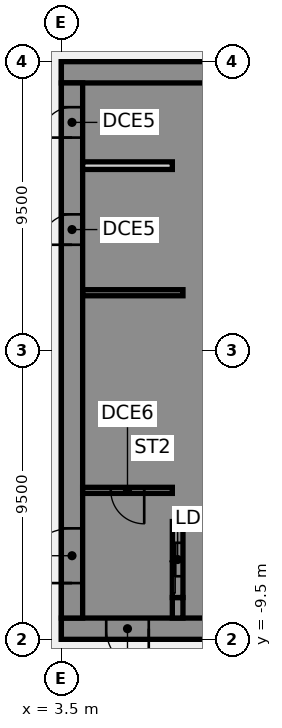
"""IFC4 building model, lengths in metres.
Left out: names, types, materials, properties, quantities, classifications, styles, units other than length and angle.
Written with IfcOpenShell. Run it as: python <this file> out.ifc"""

import sys

from ifc_helpers import new_model, si_unit, direction, frame, frame_2d, origin, place, context, subcontext, project, spatial, polyline, rectangle, outline, extrude, element, fill, save


model = new_model("IFC4")
c1 = context("Model", 3, precision=1e-05, world=origin(), true_north=direction((0.0, 1.0)))
c2 = subcontext(c1, "Body", "Model", "MODEL_VIEW")
j1 = project(units=[si_unit("LENGTHUNIT", "METRE"), si_unit("PLANEANGLEUNIT", "RADIAN")], contexts=[c1])
p1 = place(None, origin())
s1 = spatial("IfcSite", under=j1, at=p1, CompositionType="ELEMENT")
p2 = place(p1, origin())
s2 = spatial("IfcBuilding", under=s1, at=p2, CompositionType="ELEMENT")
p3 = place(p2, frame((0.0, 0.0, 56.5)))
s3 = spatial("IfcBuildingStorey", under=s2, at=p3, CompositionType="ELEMENT", Elevation=56.5)
p4 = place(p3, frame((16.5, -9.15, 0.0), z_axis=(0.0, 0.0, 1.0), x_axis=(-1.0, 0.0, 0.0)))
e1 = element("IfcWall", 1, at=p4, inside=s3, PredefinedType="SHEAR", context=c2, shape_type="SweptSolid", body=[
    extrude(rectangle(XDim=13.0, YDim=0.7, at=frame_2d((6.5, 0.0))), origin(), (0.0, 0.0, 1.0), 3.61),
])
p5 = place(p4, frame((4.15, 0.0, 0.0)))
e2 = element("IfcOpeningElement", 2, at=p5, cuts=e1, PredefinedType="OPENING", context=c2, shape_type="SweptSolid", body=[
    extrude(rectangle(XDim=1.4, YDim=2.1, at=frame_2d((0.7, 1.05))), frame((0.0, 0.36, 0.0), z_axis=(0.0, -1.0, 0.0), x_axis=(1.0, 0.0, 0.0)), (0.0, 0.0, 1.0), 0.72),
])
p6 = place(p4, frame((10.125, 0.0, 0.0)))
e3 = element("IfcOpeningElement", 3, at=p6, cuts=e1, PredefinedType="OPENING", context=c2, shape_type="SweptSolid", body=[
    extrude(rectangle(XDim=1.4, YDim=2.1, at=frame_2d((0.7, 1.05))), frame((0.0, 0.36, 0.0), z_axis=(0.0, -1.0, 0.0), x_axis=(1.0, 0.0, 0.0)), (0.0, 0.0, 1.0), 0.72),
])
p7 = place(p3, frame((16.5, 9.15, 0.0), z_axis=(0.0, 0.0, 1.0), x_axis=(-1.0, 0.0, 0.0)))
e4 = element("IfcWall", 4, at=p7, inside=s3, PredefinedType="SHEAR", context=c2, shape_type="SweptSolid", body=[
    extrude(rectangle(XDim=13.0, YDim=0.7, at=frame_2d((6.5, 0.0))), origin(), (0.0, 0.0, 1.0), 3.61),
])
p8 = place(p3, origin())
e5 = element("IfcWall", 5, at=p8, inside=s3, PredefinedType="SHEAR", context=c2, shape_type="SweptSolid", body=[
    extrude(outline(polyline([(9.8, -5.375), (7.5, -5.375), (7.5, -2.875), (9.8, -2.875), (9.8, -2.625), (7.5, -2.625), (7.5, -0.125), (9.8, -0.125), (9.8, 0.125), (7.5, 0.125), (7.5, 2.625), (9.8, 2.625), (9.8, 2.875), (7.5, 2.875), (7.5, 5.375), (9.8, 5.375), (9.8, 5.625), (7.5, 5.625), (7.5, 8.125), (9.8, 8.125), (9.8, 8.8), (7.5, 8.8), (7.15, 8.8), (7.15, -5.625), (7.5, -5.625), (9.8, -5.625), (9.8, -5.375)])), origin(), (0.0, 0.0, 1.0), 3.61),
])
p9 = place(p3, origin())
e6 = element("IfcWall", 6, at=p9, inside=s3, PredefinedType="SHEAR", context=c2, shape_type="SweptSolid", body=[
    extrude(outline(polyline([(7.5, -8.125), (7.5, -8.8), (9.8, -8.8), (9.8, -8.125), (9.8, -5.625), (9.55, -5.625), (9.55, -8.125), (7.5, -8.125)])), origin(), (0.0, 0.0, 1.0), 3.61),
])
p10 = place(p3, frame((7.325, -8.8, 0.0), z_axis=(0.0, 0.0, 1.0), x_axis=(0.0, 1.0, 0.0)))
e7 = element("IfcWall", 7, at=p10, inside=s3, PredefinedType="SHEAR", context=c2, shape_type="SweptSolid", body=[
    extrude(rectangle(XDim=0.675, YDim=0.35, at=frame_2d((0.337, 0.0))), origin(), (0.0, 0.0, 1.0), 3.61),
])
p11 = place(p3, frame((7.5, 1.9, 0.0), z_axis=(0.0, 0.0, 1.0), x_axis=(-1.0, 0.0, 0.0)))
e8 = element("IfcWall", 8, at=p11, inside=s3, PredefinedType="SHEAR", context=c2, shape_type="SweptSolid", body=[
    extrude(rectangle(XDim=3.3, YDim=0.2, at=frame_2d((1.65, 0.0))), origin(), (0.0, 0.0, 1.0), 3.61),
])
p12 = place(p3, frame((7.325, -8.125, 0.0), z_axis=(0.0, 0.0, 1.0), x_axis=(0.0, 1.0, 0.0)))
e9 = element("IfcWall", 9, at=p12, inside=s3, PredefinedType="SHEAR", context=c2, shape_type="SweptSolid", body=[
    extrude(rectangle(XDim=2.5, YDim=0.35, at=frame_2d((1.25, 0.0))), origin(), (0.0, 0.0, 1.0), 3.61),
])
p13 = place(p12, frame((0.7, 0.0, 0.0)))
e10 = element("IfcOpeningElement", 10, at=p13, cuts=e9, PredefinedType="OPENING", context=c2, shape_type="SweptSolid", body=[
    extrude(rectangle(XDim=1.1, YDim=2.1, at=frame_2d((0.55, 1.05))), frame((0.0, 0.185, 0.0), z_axis=(0.0, -1.0, 0.0), x_axis=(1.0, 0.0, 0.0)), (0.0, 0.0, 1.0), 0.37),
])
p14 = place(p3, frame((3.85, -8.8, 0.0), z_axis=(0.0, 0.0, 1.0), x_axis=(0.0, 1.0, 0.0)))
e11 = element("IfcWall", 11, at=p14, inside=s3, PredefinedType="SHEAR", context=c2, shape_type="SweptSolid", body=[
    extrude(rectangle(XDim=17.6, YDim=0.7, at=frame_2d((8.8, 0.0))), origin(), (0.0, 0.0, 1.0), 3.61),
])
p15 = place(p14, frame((1.15, 0.0, 0.0)))
e12 = element("IfcOpeningElement", 12, at=p15, cuts=e11, PredefinedType="OPENING", context=c2, shape_type="SweptSolid", body=[
    extrude(rectangle(XDim=1.8, YDim=2.1, at=frame_2d((0.9, 1.05))), frame((0.0, 0.36, 0.0), z_axis=(0.0, -1.0, 0.0), x_axis=(1.0, 0.0, 0.0)), (0.0, 0.0, 1.0), 0.72),
])
p16 = place(p14, frame((12.278, 0.0, 0.0)))
e13 = element("IfcOpeningElement", 13, at=p16, cuts=e11, PredefinedType="OPENING", context=c2, shape_type="SweptSolid", body=[
    extrude(rectangle(XDim=1.0, YDim=2.1, at=frame_2d((0.5, 1.05))), frame((0.0, 0.36, 0.0), z_axis=(0.0, -1.0, 0.0), x_axis=(1.0, 0.0, 0.0)), (0.0, 0.0, 1.0), 0.72),
])
p17 = place(p14, frame((15.802, 0.0, 0.0)))
e14 = element("IfcOpeningElement", 14, at=p17, cuts=e11, PredefinedType="OPENING", context=c2, shape_type="SweptSolid", body=[
    extrude(rectangle(XDim=1.0, YDim=2.1, at=frame_2d((0.5, 1.05))), frame((0.0, 0.36, 0.0), z_axis=(0.0, -1.0, 0.0), x_axis=(1.0, 0.0, 0.0)), (0.0, 0.0, 1.0), 0.72),
])
p18 = place(p3, frame((7.15, 6.08, 0.0), z_axis=(0.0, 0.0, 1.0), x_axis=(-1.0, 0.0, 0.0)))
e15 = element("IfcWall", 15, at=p18, inside=s3, PredefinedType="PARTITIONING", context=c2, shape_type="SweptSolid", body=[
    extrude(rectangle(XDim=2.95, YDim=0.25, at=frame_2d((1.475, 0.0))), origin(), (0.0, 0.0, 1.0), 3.61),
])
p19 = place(p3, frame((7.15, -4.6, 0.0), z_axis=(0.0, 0.0, 1.0), x_axis=(-1.0, 0.0, 0.0)))
e16 = element("IfcWall", 16, at=p19, inside=s3, PredefinedType="SHEAR", context=c2, shape_type="SweptSolid", body=[
    extrude(rectangle(XDim=2.95, YDim=0.2, at=frame_2d((1.475, 0.0))), origin(), (0.0, 0.0, 1.0), 3.61),
])
p20 = place(p19, frame((0.925, 0.0, 0.0)))
e17 = element("IfcOpeningElement", 17, at=p20, cuts=e16, PredefinedType="OPENING", context=c2, shape_type="SweptSolid", body=[
    extrude(rectangle(XDim=1.1, YDim=2.1, at=frame_2d((0.55, 1.05))), frame((0.0, 0.11, 0.0), z_axis=(0.0, -1.0, 0.0), x_axis=(1.0, 0.0, 0.0)), (0.0, 0.0, 1.0), 0.22),
])
p21 = place(p6, origin())
e18 = element("IfcDoor", 18, at=p21, inside=s3, OperationType="SINGLE_SWING_LEFT", PredefinedType="DOOR", context=c2, shape_type="SweptSolid", body=[
    extrude(rectangle(XDim=1.4, YDim=2.1, at=frame_2d((0.7, 1.05))), frame((0.0, 0.025, 0.0), z_axis=(0.0, -1.0, 0.0), x_axis=(1.0, 0.0, 0.0)), (0.0, 0.0, 1.0), 0.05),
])
fill(e3, e18)
p22 = place(p15, origin())
e19 = element("IfcDoor", 19, at=p22, inside=s3, OperationType="SINGLE_SWING_LEFT", PredefinedType="DOOR", context=c2, shape_type="SweptSolid", body=[
    extrude(rectangle(XDim=1.8, YDim=2.1, at=frame_2d((0.9, 1.05))), frame((0.0, 0.025, 0.0), z_axis=(0.0, -1.0, 0.0), x_axis=(1.0, 0.0, 0.0)), (0.0, 0.0, 1.0), 0.05),
])
fill(e12, e19)
p23 = place(p16, origin())
e20 = element("IfcDoor", 20, at=p23, inside=s3, OperationType="SINGLE_SWING_LEFT", PredefinedType="DOOR", context=c2, shape_type="SweptSolid", body=[
    extrude(rectangle(XDim=1.0, YDim=2.1, at=frame_2d((0.5, 1.05))), frame((0.0, -0.275, 0.0), z_axis=(0.0, -1.0, 0.0), x_axis=(1.0, 0.0, 0.0)), (0.0, 0.0, 1.0), 0.05),
])
fill(e13, e20)
p24 = place(p17, origin())
e21 = element("IfcDoor", 21, at=p24, inside=s3, OperationType="SINGLE_SWING_LEFT", PredefinedType="DOOR", context=c2, shape_type="SweptSolid", body=[
    extrude(rectangle(XDim=1.0, YDim=2.1, at=frame_2d((0.5, 1.05))), frame((0.0, -0.275, 0.0), z_axis=(0.0, -1.0, 0.0), x_axis=(1.0, 0.0, 0.0)), (0.0, 0.0, 1.0), 0.05),
])
fill(e14, e21)
p25 = place(p20, origin())
e22 = element("IfcDoor", 22, at=p25, inside=s3, OperationType="SINGLE_SWING_LEFT", PredefinedType="DOOR", context=c2, shape_type="SweptSolid", body=[
    extrude(rectangle(XDim=1.1, YDim=2.1, at=frame_2d((0.55, 1.05))), frame((0.0, 0.025, 0.0), z_axis=(0.0, -1.0, 0.0), x_axis=(1.0, 0.0, 0.0)), (0.0, 0.0, 1.0), 0.05),
])
fill(e17, e22)
p26 = place(p13, origin())
e23 = element("IfcDoor", 23, at=p26, inside=s3, OperationType="SLIDING_TO_LEFT", PredefinedType="DOOR", context=c2, shape_type="SweptSolid", body=[
    extrude(rectangle(XDim=1.1, YDim=2.1, at=frame_2d((0.55, 1.05))), frame((0.0, 0.025, 0.0), z_axis=(0.0, -1.0, 0.0), x_axis=(1.0, 0.0, 0.0)), (0.0, 0.0, 1.0), 0.05),
])
fill(e10, e23)
save(model, sys.argv[1])
